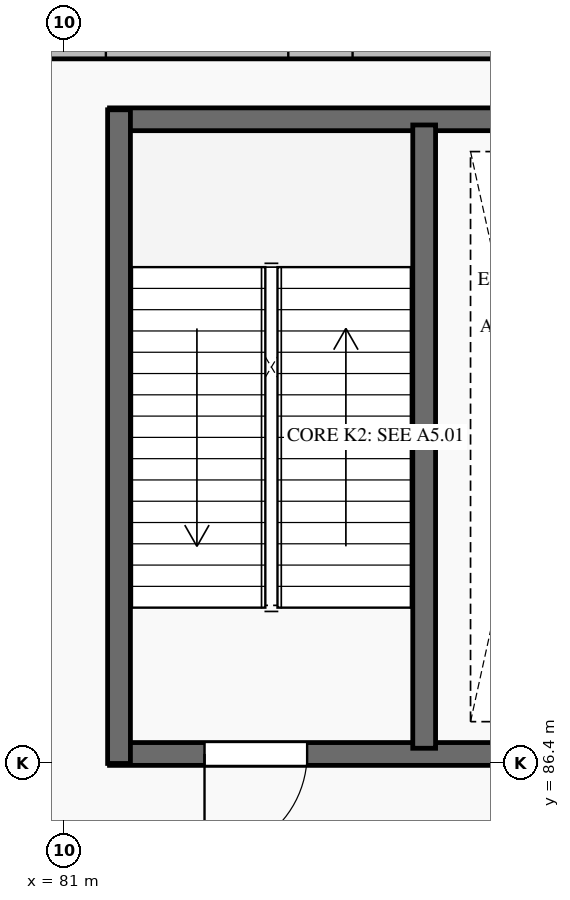
"""IFC4 building model, lengths in metres.
Left out: names, types, materials, properties, quantities, classifications, styles, units other than length and angle.
Written with IfcOpenShell. Run it as: python <this file> out.ifc"""

import sys

from ifc_helpers import new_model, si_unit, direction, frame, frame_2d, origin, place, context, subcontext, project, spatial, rectangle, extrude, element, fill, save


model = new_model("IFC4")
c1 = context("Model", 3, precision=1e-05, world=origin(), true_north=direction((0.0, 1.0)))
c2 = subcontext(c1, "Body", "Model", "MODEL_VIEW")
j1 = project(units=[si_unit("LENGTHUNIT", "METRE"), si_unit("PLANEANGLEUNIT", "RADIAN")], contexts=[c1])
p1 = place(None, origin())
s1 = spatial("IfcSite", under=j1, at=p1, CompositionType="ELEMENT")
p2 = place(p1, origin())
s2 = spatial("IfcBuilding", under=s1, at=p2, CompositionType="ELEMENT")
p3 = place(p2, origin())
s3 = spatial("IfcBuildingStorey", under=s2, at=p3, CompositionType="ELEMENT", Elevation=0.0)
p4 = place(p3, frame((79.505, 95.85, 0.0), z_axis=(0.0, 0.0, 1.0), x_axis=(1.0, 0.0, 0.0)))
e1 = element("IfcWall", 1, at=p4, inside=s3, PredefinedType="SOLIDWALL", context=c2, shape_type="SweptSolid", body=[
    extrude(rectangle(XDim=9.74, YDim=0.36, at=frame_2d((4.87, 0.0))), origin(), (0.0, 0.0, 1.0), 4.92),
])
p5 = place(p4, frame((2.047, 0.0, 0.9)))
e2 = element("IfcOpeningElement", 2, at=p5, cuts=e1, PredefinedType="OPENING", context=c2, shape_type="SweptSolid", body=[
    extrude(rectangle(XDim=2.4, YDim=3.2, at=frame_2d((1.2, 1.6))), frame((0.0, 0.195, 0.0), z_axis=(0.0, -1.0, 0.0), x_axis=(1.0, 0.0, 0.0)), (0.0, 0.0, 1.0), 0.39),
])
p6 = place(p4, frame((5.293, 0.0, 0.9)))
e3 = element("IfcOpeningElement", 3, at=p6, cuts=e1, PredefinedType="OPENING", context=c2, shape_type="SweptSolid", body=[
    extrude(rectangle(XDim=2.4, YDim=3.2, at=frame_2d((1.2, 1.6))), frame((0.0, 0.195, 0.0), z_axis=(0.0, -1.0, 0.0), x_axis=(1.0, 0.0, 0.0)), (0.0, 0.0, 1.0), 0.39),
])
p7 = place(p3, frame((81.6, 86.525, 0.0), z_axis=(0.0, 0.0, 1.0), x_axis=(1.0, 0.0, 0.0)))
e4 = element("IfcWall", 4, at=p7, inside=s3, PredefinedType="SHEAR", context=c2, shape_type="SweptSolid", body=[
    extrude(rectangle(XDim=7.0, YDim=0.3, at=frame_2d((3.5, 0.0))), origin(), (0.0, 0.0, 1.0), 6.0),
])
p8 = place(p7, frame((1.25, 0.0, 0.0)))
e5 = element("IfcOpeningElement", 5, at=p8, cuts=e4, PredefinedType="OPENING", context=c2, shape_type="SweptSolid", body=[
    extrude(rectangle(XDim=1.35, YDim=2.2, at=frame_2d((0.675, 1.1))), frame((0.0, 0.165, 0.0), z_axis=(0.0, -1.0, 0.0), x_axis=(1.0, 0.0, 0.0)), (0.0, 0.0, 1.0), 0.33),
])
p9 = place(p3, frame((81.6, 94.875, 0.0), z_axis=(0.0, 0.0, 1.0), x_axis=(1.0, 0.0, 0.0)))
e6 = element("IfcWall", 6, at=p9, inside=s3, PredefinedType="SHEAR", context=c2, shape_type="SweptSolid", body=[
    extrude(rectangle(XDim=7.0, YDim=0.3, at=frame_2d((3.5, 0.0))), origin(), (0.0, 0.0, 1.0), 6.0),
])
p10 = place(p3, frame((81.725, 86.4, 0.0), z_axis=(0.0, 0.0, 1.0), x_axis=(0.0, 1.0, 0.0)))
e7 = element("IfcWall", 7, at=p10, inside=s3, PredefinedType="SHEAR", context=c2, shape_type="SweptSolid", body=[
    extrude(rectangle(XDim=8.6, YDim=0.3, at=frame_2d((4.3, 0.0))), origin(), (0.0, 0.0, 1.0), 6.0),
])
p11 = place(p3, frame((85.74, 86.6, 0.0), z_axis=(0.0, 0.0, 1.0), x_axis=(0.0, 1.0, 0.0)))
e8 = element("IfcWall", 8, at=p11, inside=s3, PredefinedType="SHEAR", context=c2, shape_type="SweptSolid", body=[
    extrude(rectangle(XDim=8.2, YDim=0.3, at=frame_2d((4.1, 0.0))), origin(), (0.0, 0.0, 1.0), 6.0),
])
p12 = place(p8, frame((1.35, 0.0, 0.0), z_axis=(0.0, 0.0, 1.0), x_axis=(-1.0, 0.0, 0.0)))
e9 = element("IfcDoor", 9, at=p12, inside=s3, OperationType="SINGLE_SWING_LEFT", PredefinedType="DOOR", context=c2, shape_type="SweptSolid", body=[
    extrude(rectangle(XDim=1.35, YDim=2.2, at=frame_2d((0.675, 1.1))), frame((0.0, 0.025, 0.0), z_axis=(0.0, -1.0, 0.0), x_axis=(1.0, 0.0, 0.0)), (0.0, 0.0, 1.0), 0.05),
])
fill(e5, e9)
save(model, sys.argv[1])
